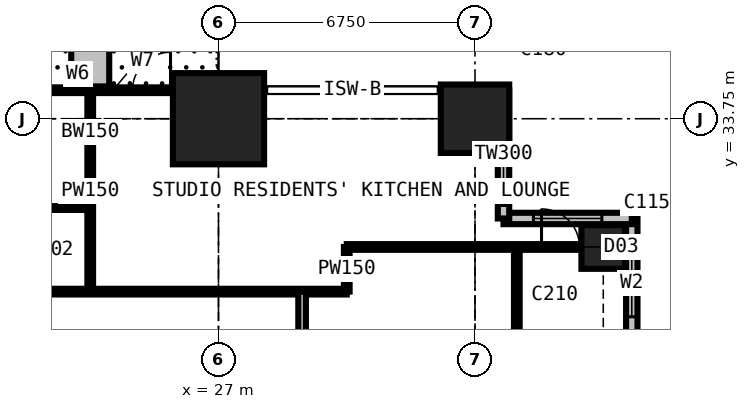
"""IFC4 building model, lengths in metres.
Left out: names, types, materials, properties, quantities, classifications, styles, units other than length and angle.
Written with IfcOpenShell. Run it as: python <this file> out.ifc"""

import sys

from ifc_helpers import new_model, si_unit, direction, frame, frame_2d, origin, origin_2d, place, context, subcontext, project, spatial, rectangle, extrude, element, fill, save


model = new_model("IFC4")
c1 = context("Model", 3, precision=1e-05, world=origin(), true_north=direction((0.0, 1.0)))
c2 = subcontext(c1, "Body", "Model", "MODEL_VIEW")
j1 = project(units=[si_unit("LENGTHUNIT", "METRE"), si_unit("PLANEANGLEUNIT", "RADIAN")], contexts=[c1])
p1 = place(None, origin())
s1 = spatial("IfcSite", under=j1, at=p1, CompositionType="ELEMENT")
p2 = place(p1, origin())
s2 = spatial("IfcBuilding", under=s1, at=p2, CompositionType="ELEMENT")
p3 = place(p2, frame((0.0, 0.0, 83.7)))
s3 = spatial("IfcBuildingStorey", under=s2, at=p3, CompositionType="ELEMENT", Elevation=83.7)
p4 = place(p3, frame((27.0, 33.75, 0.0), z_axis=(0.0, 0.0, 1.0), x_axis=(1.0, 0.0, 0.0)))
e1 = element("IfcColumn", 1, at=p4, inside=s3, PredefinedType="COLUMN", context=c2, shape_type="SweptSolid", body=[
    extrude(rectangle(XDim=2.4, YDim=2.4, at=origin_2d()), origin(), (0.0, 0.0, 1.0), 3.6),
])
p5 = place(p3, frame((33.75, 33.75, 0.0), z_axis=(0.0, 0.0, 1.0), x_axis=(1.0, 0.0, 0.0)))
e2 = element("IfcColumn", 2, at=p5, inside=s3, PredefinedType="COLUMN", context=c2, shape_type="SweptSolid", body=[
    extrude(rectangle(XDim=1.8, YDim=1.8, at=origin_2d()), origin(), (0.0, 0.0, 1.0), 3.6),
])
p6 = place(p3, frame((37.125, 30.375, 0.0), z_axis=(0.0, 0.0, 1.0), x_axis=(1.0, 0.0, 0.0)))
e3 = element("IfcColumn", 3, at=p6, inside=s3, PredefinedType="COLUMN", context=c2, shape_type="SweptSolid", body=[
    extrude(rectangle(XDim=1.15, YDim=1.15, at=origin_2d()), origin(), (0.0, 0.0, 1.0), 3.6),
])
p7 = place(p3, frame((37.875, 27.75, 0.0), z_axis=(0.0, 0.0, 1.0), x_axis=(0.0, 1.0, 0.0)))
e4 = element("IfcWall", 4, at=p7, inside=s3, PredefinedType="SOLIDWALL", context=c2, shape_type="SweptSolid", body=[
    extrude(rectangle(XDim=3.375, YDim=0.3, at=frame_2d((1.688, 0.0))), origin(), (0.0, 0.0, 1.0), 3.375),
])
p8 = place(p7, frame((0.788, 0.0, 0.6)))
e5 = element("IfcOpeningElement", 5, at=p8, cuts=e4, PredefinedType="OPENING", context=c2, shape_type="SweptSolid", body=[
    extrude(rectangle(XDim=1.8, YDim=2.1, at=frame_2d((0.9, 1.05))), frame((0.0, 0.16, 0.0), z_axis=(0.0, -1.0, 0.0), x_axis=(1.0, 0.0, 0.0)), (0.0, 0.0, 1.0), 0.32),
])
p9 = place(p3, frame((37.875, 31.125, 0.0), z_axis=(0.0, 0.0, 1.0), x_axis=(-1.0, 0.0, 0.0)))
e6 = element("IfcWall", 6, at=p9, inside=s3, PredefinedType="SOLIDWALL", context=c2, shape_type="SweptSolid", body=[
    extrude(rectangle(XDim=3.375, YDim=0.3, at=frame_2d((1.688, 0.0))), origin(), (0.0, 0.0, 1.0), 3.375),
])
p10 = place(p9, frame((0.788, 0.0, 0.6)))
e7 = element("IfcOpeningElement", 7, at=p10, cuts=e6, PredefinedType="OPENING", context=c2, shape_type="SweptSolid", body=[
    extrude(rectangle(XDim=1.8, YDim=2.1, at=frame_2d((0.9, 1.05))), frame((0.0, 0.16, 0.0), z_axis=(0.0, -1.0, 0.0), x_axis=(1.0, 0.0, 0.0)), (0.0, 0.0, 1.0), 0.32),
])
p11 = place(p3, frame((34.5, 31.125, 0.0), z_axis=(0.0, 0.0, 1.0), x_axis=(0.0, 1.0, 0.0)))
e8 = element("IfcWall", 8, at=p11, inside=s3, PredefinedType="SOLIDWALL", context=c2, shape_type="SweptSolid", body=[
    extrude(rectangle(XDim=3.375, YDim=0.3, at=frame_2d((1.688, 0.0))), origin(), (0.0, 0.0, 1.0), 3.375),
])
p12 = place(p11, frame((0.343, 0.0, 0.9)))
e9 = element("IfcOpeningElement", 9, at=p12, cuts=e8, PredefinedType="OPENING", context=c2, shape_type="SweptSolid", body=[
    extrude(rectangle(XDim=1.2, YDim=1.8, at=frame_2d((0.6, 0.9))), frame((0.0, 0.16, 0.0), z_axis=(0.0, -1.0, 0.0), x_axis=(1.0, 0.0, 0.0)), (0.0, 0.0, 1.0), 0.32),
])
p13 = place(p3, frame((20.25, 34.5, 0.0), z_axis=(0.0, 0.0, 1.0), x_axis=(1.0, 0.0, 0.0)))
e10 = element("IfcWall", 10, at=p13, inside=s3, PredefinedType="SOLIDWALL", context=c2, shape_type="SweptSolid", body=[
    extrude(rectangle(XDim=6.75, YDim=0.15, at=frame_2d((3.375, 0.0))), origin(), (0.0, 0.0, 1.0), 3.375),
])
p14 = place(p13, frame((0.962, 0.0, 0.0)))
e11 = element("IfcOpeningElement", 11, at=p14, cuts=e10, PredefinedType="OPENING", context=c2, shape_type="SweptSolid", body=[
    extrude(rectangle(XDim=1.0, YDim=2.2, at=frame_2d((0.5, 1.1))), frame((0.0, 0.085, 0.0), z_axis=(0.0, -1.0, 0.0), x_axis=(1.0, 0.0, 0.0)), (0.0, 0.0, 1.0), 0.17),
])
p15 = place(p13, frame((2.025, 0.0, 0.9)))
e12 = element("IfcOpeningElement", 12, at=p15, cuts=e10, PredefinedType="OPENING", context=c2, shape_type="SweptSolid", body=[
    extrude(rectangle(XDim=1.2, YDim=1.8, at=frame_2d((0.6, 0.9))), frame((0.0, 0.085, 0.0), z_axis=(0.0, -1.0, 0.0), x_axis=(1.0, 0.0, 0.0)), (0.0, 0.0, 1.0), 0.17),
])
p16 = place(p13, frame((4.488, 0.0, 0.0)))
e13 = element("IfcOpeningElement", 13, at=p16, cuts=e10, PredefinedType="OPENING", context=c2, shape_type="SweptSolid", body=[
    extrude(rectangle(XDim=1.0, YDim=2.2, at=frame_2d((0.5, 1.1))), frame((0.0, 0.085, 0.0), z_axis=(0.0, -1.0, 0.0), x_axis=(1.0, 0.0, 0.0)), (0.0, 0.0, 1.0), 0.17),
])
p17 = place(p13, frame((3.525, 0.0, 0.9)))
e14 = element("IfcOpeningElement", 14, at=p17, cuts=e10, PredefinedType="OPENING", context=c2, shape_type="SweptSolid", body=[
    extrude(rectangle(XDim=0.9, YDim=1.8, at=frame_2d((0.45, 0.9))), frame((0.0, 0.085, 0.0), z_axis=(0.0, -1.0, 0.0), x_axis=(1.0, 0.0, 0.0)), (0.0, 0.0, 1.0), 0.17),
])
p18 = place(p3, frame((23.625, 34.6, 0.0), z_axis=(0.0, 0.0, 1.0), x_axis=(0.0, 1.0, 0.0)))
e15 = element("IfcWall", 15, at=p18, inside=s3, PredefinedType="USERDEFINED", context=c2, shape_type="SweptSolid", body=[
    extrude(rectangle(XDim=2.2, YDim=1.0, at=frame_2d((1.1, 0.0))), origin(), (0.0, 0.0, 1.0), 0.9),
])
p19 = place(p3, frame((11.3, 29.2, 0.0), z_axis=(0.0, 0.0, 1.0), x_axis=(1.0, 0.0, 0.0)))
e16 = element("IfcWall", 16, at=p19, inside=s3, PredefinedType="PARTITIONING", context=c2, shape_type="SweptSolid", body=[
    extrude(rectangle(XDim=19.075, YDim=0.15, at=frame_2d((9.538, 0.0))), origin(), (0.0, 0.0, 1.0), 3.375),
])
p20 = place(p19, frame((5.825, 0.0, 0.0)))
e17 = element("IfcOpeningElement", 17, at=p20, cuts=e16, PredefinedType="OPENING", context=c2, shape_type="SweptSolid", body=[
    extrude(rectangle(XDim=0.95, YDim=2.2, at=frame_2d((0.475, 1.1))), frame((0.0, 0.085, 0.0), z_axis=(0.0, -1.0, 0.0), x_axis=(1.0, 0.0, 0.0)), (0.0, 0.0, 1.0), 0.17),
])
p21 = place(p19, frame((9.2, 0.0, 0.0)))
e18 = element("IfcOpeningElement", 18, at=p21, cuts=e16, PredefinedType="OPENING", context=c2, shape_type="SweptSolid", body=[
    extrude(rectangle(XDim=0.95, YDim=2.2, at=frame_2d((0.475, 1.1))), frame((0.0, 0.085, 0.0), z_axis=(0.0, -1.0, 0.0), x_axis=(1.0, 0.0, 0.0)), (0.0, 0.0, 1.0), 0.17),
])
p22 = place(p19, frame((0.6, 0.0, 0.0)))
e19 = element("IfcOpeningElement", 19, at=p22, cuts=e16, PredefinedType="OPENING", context=c2, shape_type="SweptSolid", body=[
    extrude(rectangle(XDim=1.0, YDim=2.2, at=frame_2d((0.5, 1.1))), frame((0.0, 0.085, 0.0), z_axis=(0.0, -1.0, 0.0), x_axis=(1.0, 0.0, 0.0)), (0.0, 0.0, 1.0), 0.17),
])
p23 = place(p3, frame((21.625, 31.4, 0.0), z_axis=(0.0, 0.0, 1.0), x_axis=(1.0, 0.0, 0.0)))
e20 = element("IfcWall", 20, at=p23, inside=s3, PredefinedType="PARTITIONING", context=c2, shape_type="SweptSolid", body=[
    extrude(rectangle(XDim=2.0, YDim=0.1, at=frame_2d((1.0, 0.0))), origin(), (0.0, 0.0, 1.0), 3.375),
])
p24 = place(p3, frame((23.625, 29.2, 0.0), z_axis=(0.0, 0.0, 1.0), x_axis=(0.0, 1.0, 0.0)))
e21 = element("IfcWall", 21, at=p24, inside=s3, PredefinedType="PARTITIONING", context=c2, shape_type="SweptSolid", body=[
    extrude(rectangle(XDim=5.284, YDim=0.15, at=frame_2d((2.642, 0.0))), origin(), (0.0, 0.0, 1.0), 3.375),
])
p25 = place(p3, frame((29.2, 11.3, 0.0), z_axis=(0.0, 0.0, 1.0), x_axis=(0.0, 1.0, 0.0)))
e22 = element("IfcWall", 22, at=p25, inside=s3, PredefinedType="PARTITIONING", context=c2, shape_type="SweptSolid", body=[
    extrude(rectangle(XDim=17.9, YDim=0.2, at=frame_2d((8.95, 0.0))), origin(), (0.0, 0.0, 1.0), 3.375),
])
p26 = place(p25, frame((8.35, 0.0, 0.0)))
e23 = element("IfcOpeningElement", 23, at=p26, cuts=e22, PredefinedType="OPENING", context=c2, shape_type="SweptSolid", body=[
    extrude(rectangle(XDim=1.2, YDim=2.2, at=frame_2d((0.6, 1.1))), frame((0.0, 0.11, 0.0), z_axis=(0.0, -1.0, 0.0), x_axis=(1.0, 0.0, 0.0)), (0.0, 0.0, 1.0), 0.22),
])
p27 = place(p3, frame((30.375, 29.2, 0.0), z_axis=(0.0, 0.0, 1.0), x_axis=(0.0, 1.0, 0.0)))
e24 = element("IfcWall", 24, at=p27, inside=s3, PredefinedType="PARTITIONING", context=c2, shape_type="SweptSolid", body=[
    extrude(rectangle(XDim=1.175, YDim=0.15, at=frame_2d((0.587, 0.0))), origin(), (0.0, 0.0, 1.0), 3.375),
])
p28 = place(p3, frame((30.375, 30.375, 0.0), z_axis=(0.0, 0.0, 1.0), x_axis=(1.0, 0.0, 0.0)))
e25 = element("IfcWall", 25, at=p28, inside=s3, PredefinedType="PARTITIONING", context=c2, shape_type="SweptSolid", body=[
    extrude(rectangle(XDim=7.35, YDim=0.15, at=frame_2d((3.675, 0.0))), origin(), (0.0, 0.0, 1.0), 2.877),
])
p29 = place(p28, frame((5.125, 0.0, 0.0)))
e26 = element("IfcOpeningElement", 26, at=p29, cuts=e25, PredefinedType="OPENING", context=c2, shape_type="SweptSolid", body=[
    extrude(rectangle(XDim=1.0, YDim=2.2, at=frame_2d((0.5, 1.1))), frame((0.0, 0.085, 0.0), z_axis=(0.0, -1.0, 0.0), x_axis=(1.0, 0.0, 0.0)), (0.0, 0.0, 1.0), 0.17),
])
p30 = place(p3, frame((34.85, 12.55, 0.0), z_axis=(0.0, 0.0, 1.0), x_axis=(0.0, 1.0, 0.0)))
e27 = element("IfcWall", 27, at=p30, inside=s3, PredefinedType="PARTITIONING", context=c2, shape_type="SweptSolid", body=[
    extrude(rectangle(XDim=17.825, YDim=0.15, at=frame_2d((8.913, 0.0))), origin(), (0.0, 0.0, 1.0), 3.375),
])
p31 = place(p30, frame((8.6, 0.0, 0.0)))
e28 = element("IfcOpeningElement", 28, at=p31, cuts=e27, PredefinedType="OPENING", context=c2, shape_type="SweptSolid", body=[
    extrude(rectangle(XDim=0.95, YDim=2.2, at=frame_2d((0.475, 1.1))), frame((0.0, 0.085, 0.0), z_axis=(0.0, -1.0, 0.0), x_axis=(1.0, 0.0, 0.0)), (0.0, 0.0, 1.0), 0.17),
])
p32 = place(p8, origin())
e29 = element("IfcWindow", 29, at=p32, inside=s3, PartitioningType="SINGLE_PANEL", PredefinedType="WINDOW", context=c2, shape_type="SweptSolid", body=[
    extrude(rectangle(XDim=1.8, YDim=2.1, at=frame_2d((0.9, 1.05))), frame((0.0, 0.03, 0.0), z_axis=(0.0, -1.0, 0.0), x_axis=(1.0, 0.0, 0.0)), (0.0, 0.0, 1.0), 0.06),
])
fill(e5, e29)
p33 = place(p10, origin())
e30 = element("IfcWindow", 30, at=p33, inside=s3, PartitioningType="SINGLE_PANEL", PredefinedType="WINDOW", context=c2, shape_type="SweptSolid", body=[
    extrude(rectangle(XDim=1.8, YDim=2.1, at=frame_2d((0.9, 1.05))), frame((0.0, 0.03, 0.0), z_axis=(0.0, -1.0, 0.0), x_axis=(1.0, 0.0, 0.0)), (0.0, 0.0, 1.0), 0.06),
])
fill(e7, e30)
p34 = place(p12, origin())
e31 = element("IfcWindow", 31, at=p34, inside=s3, PartitioningType="SINGLE_PANEL", PredefinedType="WINDOW", context=c2, shape_type="SweptSolid", body=[
    extrude(rectangle(XDim=1.2, YDim=1.8, at=frame_2d((0.6, 0.9))), frame((0.0, 0.03, 0.0), z_axis=(0.0, -1.0, 0.0), x_axis=(1.0, 0.0, 0.0)), (0.0, 0.0, 1.0), 0.06),
])
fill(e9, e31)
p35 = place(p15, origin())
e32 = element("IfcWindow", 32, at=p35, inside=s3, PartitioningType="SINGLE_PANEL", PredefinedType="WINDOW", context=c2, shape_type="SweptSolid", body=[
    extrude(rectangle(XDim=1.2, YDim=1.8, at=frame_2d((0.6, 0.9))), frame((0.0, 0.03, 0.0), z_axis=(0.0, -1.0, 0.0), x_axis=(1.0, 0.0, 0.0)), (0.0, 0.0, 1.0), 0.06),
])
fill(e12, e32)
p36 = place(p16, origin())
e33 = element("IfcDoor", 33, at=p36, inside=s3, OperationType="SINGLE_SWING_RIGHT", PredefinedType="DOOR", context=c2, shape_type="SweptSolid", body=[
    extrude(rectangle(XDim=1.0, YDim=2.2, at=frame_2d((0.5, 1.1))), frame((0.0, 0.025, 0.0), z_axis=(0.0, -1.0, 0.0), x_axis=(1.0, 0.0, 0.0)), (0.0, 0.0, 1.0), 0.05),
])
fill(e13, e33)
p37 = place(p17, origin())
e34 = element("IfcWindow", 34, at=p37, inside=s3, PartitioningType="SINGLE_PANEL", PredefinedType="WINDOW", context=c2, shape_type="SweptSolid", body=[
    extrude(rectangle(XDim=0.9, YDim=1.8, at=frame_2d((0.45, 0.9))), frame((0.0, 0.03, 0.0), z_axis=(0.0, -1.0, 0.0), x_axis=(1.0, 0.0, 0.0)), (0.0, 0.0, 1.0), 0.06),
])
fill(e14, e34)
p38 = place(p29, origin())
e35 = element("IfcDoor", 35, at=p38, inside=s3, OperationType="SINGLE_SWING_LEFT", PredefinedType="DOOR", context=c2, shape_type="SweptSolid", body=[
    extrude(rectangle(XDim=1.0, YDim=2.2, at=frame_2d((0.5, 1.1))), frame((0.0, 0.025, 0.0), z_axis=(0.0, -1.0, 0.0), x_axis=(1.0, 0.0, 0.0)), (0.0, 0.0, 1.0), 0.05),
])
fill(e26, e35)
save(model, sys.argv[1])
